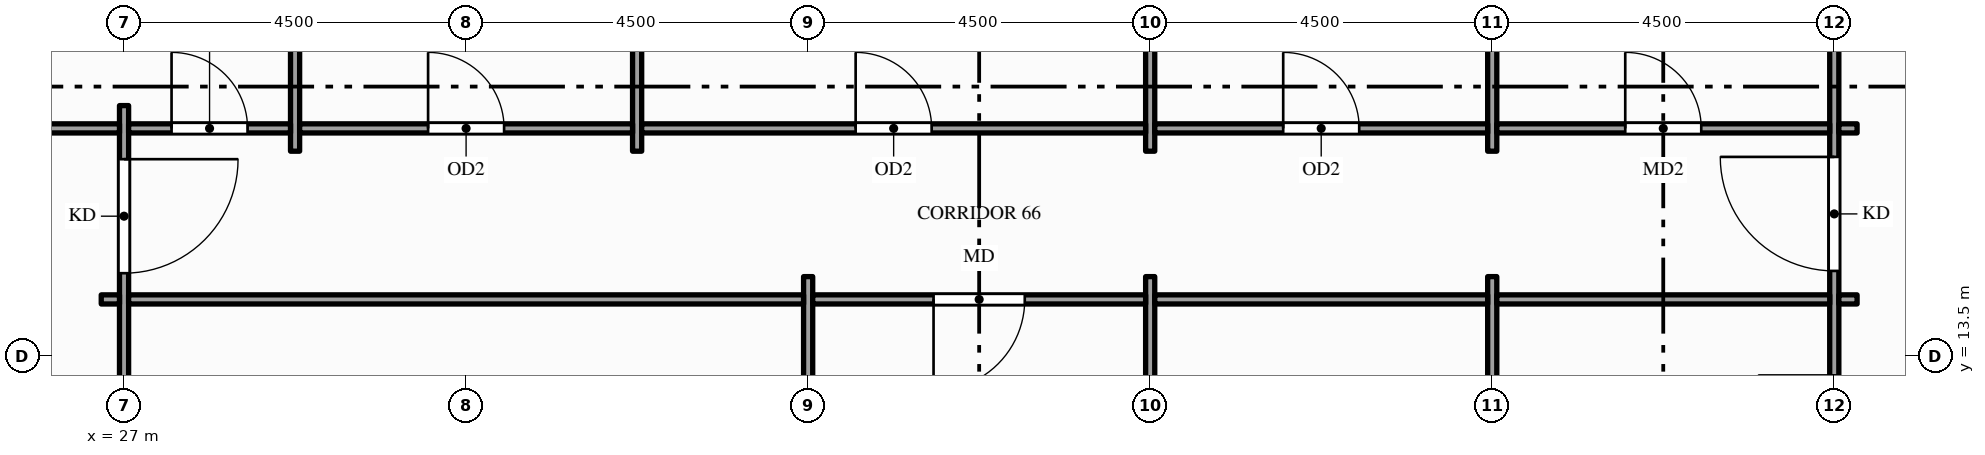
"""IFC4 building model, lengths in metres.
Left out: names, types, materials, properties, quantities, classifications, styles, units other than length and angle.
Written with IfcOpenShell. Run it as: python <this file> out.ifc"""

import sys

from ifc_helpers import new_model, si_unit, direction, frame, frame_2d, origin, place, context, subcontext, project, spatial, rectangle, extrude, element, fill, save


model = new_model("IFC4")
c1 = context("Model", 3, precision=1e-05, world=origin(), true_north=direction((0.0, 1.0)))
c2 = subcontext(c1, "Body", "Model", "MODEL_VIEW")
j1 = project(units=[si_unit("LENGTHUNIT", "METRE"), si_unit("PLANEANGLEUNIT", "RADIAN")], contexts=[c1])
p1 = place(None, origin())
s1 = spatial("IfcSite", under=j1, at=p1, CompositionType="ELEMENT")
p2 = place(p1, origin())
s2 = spatial("IfcBuilding", under=s1, at=p2, CompositionType="ELEMENT")
p3 = place(p2, frame((0.0, 0.0, 199.0)))
s3 = spatial("IfcBuildingStorey", under=s2, at=p3, CompositionType="ELEMENT", Elevation=199.0)
p4 = place(p3, frame((27.0, 2.7, 0.0), z_axis=(0.0, 0.0, 1.0), x_axis=(0.0, 1.0, 0.0)))
e1 = element("IfcWall", 1, at=p4, inside=s3, PredefinedType="PARTITIONING", context=c2, shape_type="SweptSolid", body=[
    extrude(rectangle(XDim=14.1, YDim=0.12, at=frame_2d((7.05, 0.0))), origin(), (0.0, 0.0, 1.0), 2.87),
])
p5 = place(p4, frame((0.705, 0.0, 0.0)))
e2 = element("IfcOpeningElement", 2, at=p5, cuts=e1, PredefinedType="OPENING", context=c2, shape_type="SweptSolid", body=[
    extrude(rectangle(XDim=1.5, YDim=2.1, at=frame_2d((0.75, 1.05))), frame((0.0, 0.07, 0.0), z_axis=(0.0, -1.0, 0.0), x_axis=(1.0, 0.0, 0.0)), (0.0, 0.0, 1.0), 0.14),
])
p6 = place(p4, frame((11.895, 0.0, 0.0)))
e3 = element("IfcOpeningElement", 3, at=p6, cuts=e1, PredefinedType="OPENING", context=c2, shape_type="SweptSolid", body=[
    extrude(rectangle(XDim=1.5, YDim=2.1, at=frame_2d((0.75, 1.05))), frame((0.0, 0.07, 0.0), z_axis=(0.0, -1.0, 0.0), x_axis=(1.0, 0.0, 0.0)), (0.0, 0.0, 1.0), 0.14),
])
for number, where, z_axis, x_axis in (
    (4, (29.25, 16.2, 0.0), (0.0, 0.0, 1.0), (0.0, 1.0, 0.0)),
    (5, (33.75, 16.2, 0.0), (0.0, 0.0, 1.0), (0.0, 1.0, 0.0)),
):
    element("IfcWall", number, at=place(p3, frame(where, z_axis=z_axis, x_axis=x_axis)), inside=s3, PredefinedType="PARTITIONING", context=c2, shape_type="SweptSolid", body=[
        extrude(rectangle(XDim=4.65, YDim=0.12, at=frame_2d((2.325, 0.0))), origin(), (0.0, 0.0, 1.0), 2.87),
    ])
for number, where, z_axis, x_axis in (
    (6, (36.0, 4.95, 0.0), (0.0, 0.0, 1.0), (0.0, 1.0, 0.0)),
    (7, (40.5, 4.95, 0.0), (0.0, 0.0, 1.0), (0.0, 1.0, 0.0)),
):
    element("IfcWall", number, at=place(p3, frame(where, z_axis=z_axis, x_axis=x_axis)), inside=s3, PredefinedType="PARTITIONING", context=c2, shape_type="SweptSolid", body=[
        extrude(rectangle(XDim=9.6, YDim=0.12, at=frame_2d((4.8, 0.0))), origin(), (0.0, 0.0, 1.0), 2.87),
    ])
p7 = place(p3, frame((40.5, 16.2, 0.0), z_axis=(0.0, 0.0, 1.0), x_axis=(0.0, 1.0, 0.0)))
e8 = element("IfcWall", 8, at=p7, inside=s3, PredefinedType="PARTITIONING", context=c2, shape_type="SweptSolid", body=[
    extrude(rectangle(XDim=4.65, YDim=0.12, at=frame_2d((2.325, 0.0))), origin(), (0.0, 0.0, 1.0), 2.87),
])
p8 = place(p3, frame((45.0, 4.95, 0.0), z_axis=(0.0, 0.0, 1.0), x_axis=(0.0, 1.0, 0.0)))
e9 = element("IfcWall", 9, at=p8, inside=s3, PredefinedType="PARTITIONING", context=c2, shape_type="SweptSolid", body=[
    extrude(rectangle(XDim=9.6, YDim=0.12, at=frame_2d((4.8, 0.0))), origin(), (0.0, 0.0, 1.0), 2.87),
])
p9 = place(p3, frame((45.0, 16.2, 0.0), z_axis=(0.0, 0.0, 1.0), x_axis=(0.0, 1.0, 0.0)))
e10 = element("IfcWall", 10, at=p9, inside=s3, PredefinedType="PARTITIONING", context=c2, shape_type="SweptSolid", body=[
    extrude(rectangle(XDim=4.65, YDim=0.12, at=frame_2d((2.325, 0.0))), origin(), (0.0, 0.0, 1.0), 2.87),
])
p10 = place(p3, frame((49.5, -1.35, 0.0), z_axis=(0.0, 0.0, 1.0), x_axis=(0.0, 1.0, 0.0)))
e11 = element("IfcWall", 11, at=p10, inside=s3, PredefinedType="PARTITIONING", context=c2, shape_type="SweptSolid", body=[
    extrude(rectangle(XDim=22.2, YDim=0.12, at=frame_2d((11.1, 0.0))), origin(), (0.0, 0.0, 1.0), 2.87),
])
p11 = place(p10, frame((4.725, 0.0, 0.0)))
e12 = element("IfcOpeningElement", 12, at=p11, cuts=e11, PredefinedType="OPENING", context=c2, shape_type="SweptSolid", body=[
    extrude(rectangle(XDim=1.5, YDim=2.1, at=frame_2d((0.75, 1.05))), frame((0.0, 0.07, 0.0), z_axis=(0.0, -1.0, 0.0), x_axis=(1.0, 0.0, 0.0)), (0.0, 0.0, 1.0), 0.14),
])
p12 = place(p10, frame((15.975, 0.0, 0.0)))
e13 = element("IfcOpeningElement", 13, at=p12, cuts=e11, PredefinedType="OPENING", context=c2, shape_type="SweptSolid", body=[
    extrude(rectangle(XDim=1.5, YDim=2.1, at=frame_2d((0.75, 1.05))), frame((0.0, 0.07, 0.0), z_axis=(0.0, -1.0, 0.0), x_axis=(1.0, 0.0, 0.0)), (0.0, 0.0, 1.0), 0.14),
])
p13 = place(p10, frame((7.6, 0.0, 0.0)))
e14 = element("IfcOpeningElement", 14, at=p13, cuts=e11, PredefinedType="OPENING", context=c2, shape_type="SweptSolid", body=[
    extrude(rectangle(XDim=0.9, YDim=2.1, at=frame_2d((0.45, 1.05))), frame((0.0, 0.07, 0.0), z_axis=(0.0, -1.0, 0.0), x_axis=(1.0, 0.0, 0.0)), (0.0, 0.0, 1.0), 0.14),
])
p14 = place(p10, frame((10.65, 0.0, 0.0)))
e15 = element("IfcOpeningElement", 15, at=p14, cuts=e11, PredefinedType="OPENING", context=c2, shape_type="SweptSolid", body=[
    extrude(rectangle(XDim=0.9, YDim=2.1, at=frame_2d((0.45, 1.05))), frame((0.0, 0.07, 0.0), z_axis=(0.0, -1.0, 0.0), x_axis=(1.0, 0.0, 0.0)), (0.0, 0.0, 1.0), 0.14),
])
p15 = place(p10, frame((13.6, 0.0, 0.0)))
e16 = element("IfcOpeningElement", 16, at=p15, cuts=e11, PredefinedType="OPENING", context=c2, shape_type="SweptSolid", body=[
    extrude(rectangle(XDim=1.0, YDim=2.1, at=frame_2d((0.5, 1.05))), frame((0.0, 0.07, 0.0), z_axis=(0.0, -1.0, 0.0), x_axis=(1.0, 0.0, 0.0)), (0.0, 0.0, 1.0), 0.14),
])
p16 = place(p3, frame((26.7, 14.25, 0.0), z_axis=(0.0, 0.0, 1.0), x_axis=(1.0, 0.0, 0.0)))
e17 = element("IfcWall", 17, at=p16, inside=s3, PredefinedType="PARTITIONING", context=c2, shape_type="SweptSolid", body=[
    extrude(rectangle(XDim=0.24, YDim=0.12, at=frame_2d((0.12, 0.0))), origin(), (0.0, 0.0, 1.0), 2.87),
])
p17 = place(p3, frame((27.06, 14.25, 0.0), z_axis=(0.0, 0.0, 1.0), x_axis=(1.0, 0.0, 0.0)))
e18 = element("IfcWall", 18, at=p17, inside=s3, PredefinedType="PARTITIONING", context=c2, shape_type="SweptSolid", body=[
    extrude(rectangle(XDim=8.88, YDim=0.12, at=frame_2d((4.44, 0.0))), origin(), (0.0, 0.0, 1.0), 2.87),
])
p18 = place(p3, frame((36.06, 14.25, 0.0), z_axis=(0.0, 0.0, 1.0), x_axis=(1.0, 0.0, 0.0)))
e19 = element("IfcWall", 19, at=p18, inside=s3, PredefinedType="PARTITIONING", context=c2, shape_type="SweptSolid", body=[
    extrude(rectangle(XDim=4.38, YDim=0.12, at=frame_2d((2.19, 0.0))), origin(), (0.0, 0.0, 1.0), 2.87),
])
p19 = place(p18, frame((1.59, 0.0, 0.0)))
e20 = element("IfcOpeningElement", 20, at=p19, cuts=e19, PredefinedType="OPENING", context=c2, shape_type="SweptSolid", body=[
    extrude(rectangle(XDim=1.2, YDim=2.1, at=frame_2d((0.6, 1.05))), frame((0.0, 0.07, 0.0), z_axis=(0.0, -1.0, 0.0), x_axis=(1.0, 0.0, 0.0)), (0.0, 0.0, 1.0), 0.14),
])
for number, where, z_axis, x_axis in (
    (21, (40.56, 14.25, 0.0), (0.0, 0.0, 1.0), (1.0, 0.0, 0.0)),
    (22, (45.06, 14.25, 0.0), (0.0, 0.0, 1.0), (1.0, 0.0, 0.0)),
):
    element("IfcWall", number, at=place(p3, frame(where, z_axis=z_axis, x_axis=x_axis)), inside=s3, PredefinedType="PARTITIONING", context=c2, shape_type="SweptSolid", body=[
        extrude(rectangle(XDim=4.38, YDim=0.12, at=frame_2d((2.19, 0.0))), origin(), (0.0, 0.0, 1.0), 2.87),
    ])
p20 = place(p3, frame((49.56, 14.25, 0.0), z_axis=(0.0, 0.0, 1.0), x_axis=(1.0, 0.0, 0.0)))
e23 = element("IfcWall", 23, at=p20, inside=s3, PredefinedType="PARTITIONING", context=c2, shape_type="SweptSolid", body=[
    extrude(rectangle(XDim=0.24, YDim=0.12, at=frame_2d((0.12, 0.0))), origin(), (0.0, 0.0, 1.0), 2.87),
])
p21 = place(p3, frame((24.81, 16.5, 0.0), z_axis=(0.0, 0.0, 1.0), x_axis=(1.0, 0.0, 0.0)))
e24 = element("IfcWall", 24, at=p21, inside=s3, PredefinedType="PARTITIONING", context=c2, shape_type="SweptSolid", body=[
    extrude(rectangle(XDim=2.13, YDim=0.12, at=frame_2d((1.065, 0.0))), origin(), (0.0, 0.0, 1.0), 2.76),
])
p22 = place(p3, frame((27.06, 16.5, 0.0), z_axis=(0.0, 0.0, 1.0), x_axis=(1.0, 0.0, 0.0)))
e25 = element("IfcWall", 25, at=p22, inside=s3, PredefinedType="PARTITIONING", context=c2, shape_type="SweptSolid", body=[
    extrude(rectangle(XDim=2.13, YDim=0.12, at=frame_2d((1.065, 0.0))), origin(), (0.0, 0.0, 1.0), 2.87),
])
p23 = place(p22, frame((0.565, 0.0, 0.0)))
e26 = element("IfcOpeningElement", 26, at=p23, cuts=e25, PredefinedType="OPENING", context=c2, shape_type="SweptSolid", body=[
    extrude(rectangle(XDim=1.0, YDim=2.1, at=frame_2d((0.5, 1.05))), frame((0.0, 0.07, 0.0), z_axis=(0.0, -1.0, 0.0), x_axis=(1.0, 0.0, 0.0)), (0.0, 0.0, 1.0), 0.14),
])
p24 = place(p3, frame((29.31, 16.5, 0.0), z_axis=(0.0, 0.0, 1.0), x_axis=(1.0, 0.0, 0.0)))
e27 = element("IfcWall", 27, at=p24, inside=s3, PredefinedType="PARTITIONING", context=c2, shape_type="SweptSolid", body=[
    extrude(rectangle(XDim=4.38, YDim=0.12, at=frame_2d((2.19, 0.0))), origin(), (0.0, 0.0, 1.0), 2.87),
])
p25 = place(p24, frame((1.69, 0.0, 0.0)))
e28 = element("IfcOpeningElement", 28, at=p25, cuts=e27, PredefinedType="OPENING", context=c2, shape_type="SweptSolid", body=[
    extrude(rectangle(XDim=1.0, YDim=2.1, at=frame_2d((0.5, 1.05))), frame((0.0, 0.07, 0.0), z_axis=(0.0, -1.0, 0.0), x_axis=(1.0, 0.0, 0.0)), (0.0, 0.0, 1.0), 0.14),
])
p26 = place(p3, frame((33.81, 16.5, 0.0), z_axis=(0.0, 0.0, 1.0), x_axis=(1.0, 0.0, 0.0)))
e29 = element("IfcWall", 29, at=p26, inside=s3, PredefinedType="PARTITIONING", context=c2, shape_type="SweptSolid", body=[
    extrude(rectangle(XDim=6.63, YDim=0.12, at=frame_2d((3.315, 0.0))), origin(), (0.0, 0.0, 1.0), 2.87),
])
p27 = place(p26, frame((2.815, 0.0, 0.0)))
e30 = element("IfcOpeningElement", 30, at=p27, cuts=e29, PredefinedType="OPENING", context=c2, shape_type="SweptSolid", body=[
    extrude(rectangle(XDim=1.0, YDim=2.1, at=frame_2d((0.5, 1.05))), frame((0.0, 0.07, 0.0), z_axis=(0.0, -1.0, 0.0), x_axis=(1.0, 0.0, 0.0)), (0.0, 0.0, 1.0), 0.14),
])
p28 = place(p3, frame((40.56, 16.5, 0.0), z_axis=(0.0, 0.0, 1.0), x_axis=(1.0, 0.0, 0.0)))
e31 = element("IfcWall", 31, at=p28, inside=s3, PredefinedType="PARTITIONING", context=c2, shape_type="SweptSolid", body=[
    extrude(rectangle(XDim=4.38, YDim=0.12, at=frame_2d((2.19, 0.0))), origin(), (0.0, 0.0, 1.0), 2.87),
])
p29 = place(p28, frame((1.69, 0.0, 0.0)))
e32 = element("IfcOpeningElement", 32, at=p29, cuts=e31, PredefinedType="OPENING", context=c2, shape_type="SweptSolid", body=[
    extrude(rectangle(XDim=1.0, YDim=2.1, at=frame_2d((0.5, 1.05))), frame((0.0, 0.07, 0.0), z_axis=(0.0, -1.0, 0.0), x_axis=(1.0, 0.0, 0.0)), (0.0, 0.0, 1.0), 0.14),
])
p30 = place(p3, frame((45.06, 16.5, 0.0), z_axis=(0.0, 0.0, 1.0), x_axis=(1.0, 0.0, 0.0)))
e33 = element("IfcWall", 33, at=p30, inside=s3, PredefinedType="PARTITIONING", context=c2, shape_type="SweptSolid", body=[
    extrude(rectangle(XDim=4.38, YDim=0.12, at=frame_2d((2.19, 0.0))), origin(), (0.0, 0.0, 1.0), 2.87),
])
p31 = place(p30, frame((1.69, 0.0, 0.0)))
e34 = element("IfcOpeningElement", 34, at=p31, cuts=e33, PredefinedType="OPENING", context=c2, shape_type="SweptSolid", body=[
    extrude(rectangle(XDim=1.0, YDim=2.1, at=frame_2d((0.5, 1.05))), frame((0.0, 0.07, 0.0), z_axis=(0.0, -1.0, 0.0), x_axis=(1.0, 0.0, 0.0)), (0.0, 0.0, 1.0), 0.14),
])
p32 = place(p3, frame((49.56, 16.5, 0.0), z_axis=(0.0, 0.0, 1.0), x_axis=(1.0, 0.0, 0.0)))
e35 = element("IfcWall", 35, at=p32, inside=s3, PredefinedType="PARTITIONING", context=c2, shape_type="SweptSolid", body=[
    extrude(rectangle(XDim=0.24, YDim=0.12, at=frame_2d((0.12, 0.0))), origin(), (0.0, 0.0, 1.0), 2.87),
])
p33 = place(p6, origin())
e36 = element("IfcDoor", 36, at=p33, inside=s3, OperationType="SINGLE_SWING_RIGHT", PredefinedType="DOOR", context=c2, shape_type="SweptSolid", body=[
    extrude(rectangle(XDim=1.5, YDim=2.1, at=frame_2d((0.75, 1.05))), frame((0.0, 0.025, 0.0), z_axis=(0.0, -1.0, 0.0), x_axis=(1.0, 0.0, 0.0)), (0.0, 0.0, 1.0), 0.05),
])
fill(e3, e36)
p34 = place(p12, origin())
e37 = element("IfcDoor", 37, at=p34, inside=s3, OperationType="SINGLE_SWING_RIGHT", PredefinedType="DOOR", context=c2, shape_type="SweptSolid", body=[
    extrude(rectangle(XDim=1.5, YDim=2.1, at=frame_2d((0.75, 1.05))), frame((0.0, 0.025, 0.0), z_axis=(0.0, -1.0, 0.0), x_axis=(1.0, 0.0, 0.0)), (0.0, 0.0, 1.0), 0.05),
])
fill(e13, e37)
p35 = place(p19, origin())
e38 = element("IfcDoor", 38, at=p35, inside=s3, OperationType="SINGLE_SWING_LEFT", PredefinedType="DOOR", context=c2, shape_type="SweptSolid", body=[
    extrude(rectangle(XDim=1.2, YDim=2.1, at=frame_2d((0.6, 1.05))), frame((0.0, 0.025, 0.0), z_axis=(0.0, -1.0, 0.0), x_axis=(1.0, 0.0, 0.0)), (0.0, 0.0, 1.0), 0.05),
])
fill(e20, e38)
p36 = place(p23, origin())
e39 = element("IfcDoor", 39, at=p36, inside=s3, OperationType="SINGLE_SWING_LEFT", PredefinedType="DOOR", context=c2, shape_type="SweptSolid", body=[
    extrude(rectangle(XDim=1.0, YDim=2.1, at=frame_2d((0.5, 1.05))), frame((0.0, 0.025, 0.0), z_axis=(0.0, -1.0, 0.0), x_axis=(1.0, 0.0, 0.0)), (0.0, 0.0, 1.0), 0.05),
])
fill(e26, e39)
p37 = place(p25, origin())
e40 = element("IfcDoor", 40, at=p37, inside=s3, OperationType="SINGLE_SWING_LEFT", PredefinedType="DOOR", context=c2, shape_type="SweptSolid", body=[
    extrude(rectangle(XDim=1.0, YDim=2.1, at=frame_2d((0.5, 1.05))), frame((0.0, 0.025, 0.0), z_axis=(0.0, -1.0, 0.0), x_axis=(1.0, 0.0, 0.0)), (0.0, 0.0, 1.0), 0.05),
])
fill(e28, e40)
p38 = place(p27, origin())
e41 = element("IfcDoor", 41, at=p38, inside=s3, OperationType="SINGLE_SWING_LEFT", PredefinedType="DOOR", context=c2, shape_type="SweptSolid", body=[
    extrude(rectangle(XDim=1.0, YDim=2.1, at=frame_2d((0.5, 1.05))), frame((0.0, 0.025, 0.0), z_axis=(0.0, -1.0, 0.0), x_axis=(1.0, 0.0, 0.0)), (0.0, 0.0, 1.0), 0.05),
])
fill(e30, e41)
p39 = place(p29, origin())
e42 = element("IfcDoor", 42, at=p39, inside=s3, OperationType="SINGLE_SWING_LEFT", PredefinedType="DOOR", context=c2, shape_type="SweptSolid", body=[
    extrude(rectangle(XDim=1.0, YDim=2.1, at=frame_2d((0.5, 1.05))), frame((0.0, 0.025, 0.0), z_axis=(0.0, -1.0, 0.0), x_axis=(1.0, 0.0, 0.0)), (0.0, 0.0, 1.0), 0.05),
])
fill(e32, e42)
p40 = place(p31, origin())
e43 = element("IfcDoor", 43, at=p40, inside=s3, OperationType="SINGLE_SWING_LEFT", PredefinedType="DOOR", context=c2, shape_type="SweptSolid", body=[
    extrude(rectangle(XDim=1.0, YDim=2.1, at=frame_2d((0.5, 1.05))), frame((0.0, 0.025, 0.0), z_axis=(0.0, -1.0, 0.0), x_axis=(1.0, 0.0, 0.0)), (0.0, 0.0, 1.0), 0.05),
])
fill(e34, e43)
save(model, sys.argv[1])
